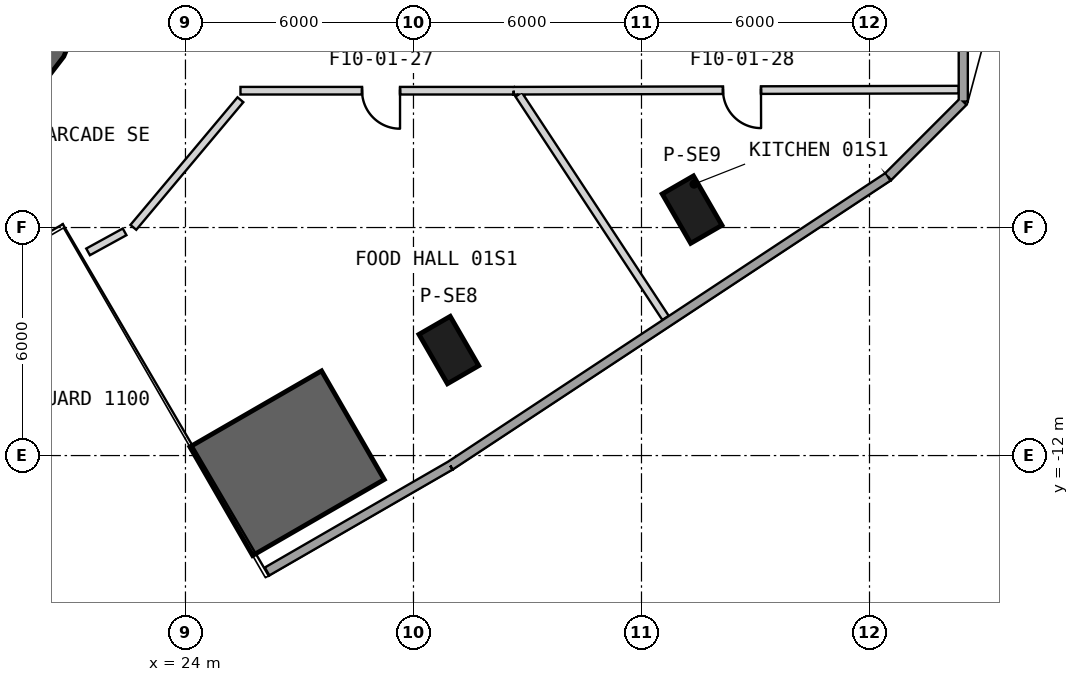
"""IFC4 building model, lengths in metres.
Left out: names, types, materials, properties, quantities, classifications, styles, units other than length and angle.
Written with IfcOpenShell. Run it as: python <this file> out.ifc"""

import sys

from ifc_helpers import new_model, si_unit, direction, frame, frame_2d, origin, origin_2d, place, context, subcontext, project, spatial, polyline, rectangle, outline, extrude, element, fill, save


model = new_model("IFC4")
c1 = context("Model", 3, precision=1e-05, world=origin(), true_north=direction((0.0, 1.0)))
c2 = subcontext(c1, "Body", "Model", "MODEL_VIEW")
j1 = project(units=[si_unit("LENGTHUNIT", "METRE"), si_unit("PLANEANGLEUNIT", "RADIAN")], contexts=[c1])
p1 = place(None, origin())
s1 = spatial("IfcSite", under=j1, at=p1, CompositionType="ELEMENT")
p2 = place(p1, origin())
s2 = spatial("IfcBuilding", under=s1, at=p2, CompositionType="ELEMENT")
p3 = place(p2, frame((0.0, 0.0, 9.0)))
s3 = spatial("IfcBuildingStorey", under=s2, at=p3, CompositionType="ELEMENT", Elevation=9.0)
for number, where, z_axis, x_axis in (
    (1, (30.93, -9.224, 0.0), (0.0, 0.0, 1.0), (0.5, -0.866, 0.0)),
    (2, (37.331, -5.528, 0.0), (0.0, 0.0, 1.0), (0.5, -0.866, 0.0)),
):
    element("IfcColumn", number, at=place(p3, frame(where, z_axis=z_axis, x_axis=x_axis)), inside=s3, PredefinedType="COLUMN", context=c2, shape_type="SweptSolid", body=[
        extrude(rectangle(XDim=1.5, YDim=0.95, at=origin_2d()), origin(), (0.0, 0.0, 1.0), 6.5),
    ])
p4 = place(p3, origin())
e3 = element("IfcWall", 3, at=p4, inside=s3, PredefinedType="SHEAR", context=c2, shape_type="SweptSolid", body=[
    extrude(outline(polyline([(19.7, -2.598), (20.321, -2.121), (20.798, -1.5), (21.098, -0.777), (21.2, 0.0), (21.098, 0.777), (20.798, 1.5), (20.321, 2.121), (19.7, 2.598), (19.25, 1.819), (19.685, 1.485), (20.019, 1.05), (20.229, 0.543), (20.3, 0.0), (20.229, -0.543), (20.019, -1.05), (19.685, -1.485), (19.25, -1.819), (19.7, -2.598)])), origin(), (0.0, 0.0, 1.0), 6.5),
])
p5 = place(p3, origin())
e4 = element("IfcWall", 4, at=p5, inside=s3, PredefinedType="SHEAR", context=c2, shape_type="SweptSolid", body=[
    extrude(outline(polyline([(25.767, -14.63), (29.231, -12.63), (27.581, -9.772), (24.117, -11.772), (25.767, -14.63)])), origin(), (0.0, 0.0, 1.0), 6.5),
])
p6 = place(p3, frame((26.147, -15.05, 0.0), z_axis=(0.0, 0.0, 1.0), x_axis=(0.865999312459, 0.500045188778, 0.0)))
e5 = element("IfcWall", 5, at=p6, inside=s3, PredefinedType="SOLIDWALL", context=c2, shape_type="SweptSolid", body=[
    extrude(rectangle(XDim=5.566, YDim=0.24, at=frame_2d((2.783, 0.0))), origin(), (0.0, 0.0, 1.0), 6.2),
])
p7 = place(p3, frame((30.968, -12.267, 0.0), z_axis=(0.0, 0.0, 1.0), x_axis=(0.834683405501, 0.550730072342, 0.0)))
e6 = element("IfcWall", 6, at=p7, inside=s3, PredefinedType="SOLIDWALL", context=c2, shape_type="SweptSolid", body=[
    extrude(rectangle(XDim=13.801, YDim=0.24, at=frame_2d((6.901, 0.0))), origin(), (0.0, 0.0, 1.0), 6.2),
])
p8 = place(p3, frame((42.487, -4.666, 0.0), z_axis=(0.0, 0.0, 1.0), x_axis=(0.707106781187, 0.707106781187, 0.0)))
e7 = element("IfcWall", 7, at=p8, inside=s3, PredefinedType="SOLIDWALL", context=c2, shape_type="SweptSolid", body=[
    extrude(rectangle(XDim=2.801, YDim=0.24, at=frame_2d((1.4, 0.0))), origin(), (0.0, 0.0, 1.0), 6.2),
])
p9 = place(p3, frame((44.468, -2.686, 0.0), z_axis=(0.0, 0.0, 1.0), x_axis=(0.0, 1.0, 0.0)))
e8 = element("IfcWall", 8, at=p9, inside=s3, PredefinedType="SOLIDWALL", context=c2, shape_type="SweptSolid", body=[
    extrude(rectangle(XDim=5.371, YDim=0.24, at=frame_2d((2.686, 0.0))), origin(), (0.0, 0.0, 1.0), 6.2),
])
p10 = place(p3, frame((32.639, -2.4, 0.0), z_axis=(0.0, 0.0, 1.0), x_axis=(-0.999999999424, -3.3950093e-05, 0.0)))
e9 = element("IfcWall", 9, at=p10, inside=s3, PredefinedType="PARTITIONING", context=c2, shape_type="SweptSolid", body=[
    extrude(rectangle(XDim=7.191, YDim=0.2, at=frame_2d((3.596, 0.0))), origin(), (0.0, 0.0, 1.0), 6.2),
])
p11 = place(p10, frame((2.992, 0.0, 0.0)))
e10 = element("IfcOpeningElement", 10, at=p11, cuts=e9, PredefinedType="OPENING", context=c2, shape_type="SweptSolid", body=[
    extrude(rectangle(XDim=1.0, YDim=2.1, at=frame_2d((0.5, 1.05))), frame((0.0, 0.11, 0.0), z_axis=(0.0, -1.0, 0.0), x_axis=(1.0, 0.0, 0.0)), (0.0, 0.0, 1.0), 0.22),
])
p12 = place(p3, frame((22.629, -5.995, 0.0), z_axis=(0.0, 0.0, 1.0), x_axis=(0.642788383403, 0.766043793893, 0.0)))
e11 = element("IfcWall", 11, at=p12, inside=s3, PredefinedType="PARTITIONING", context=c2, shape_type="SweptSolid", body=[
    extrude(rectangle(XDim=4.384, YDim=0.2, at=frame_2d((2.192, 0.0))), origin(), (0.0, 0.0, 1.0), 5.28),
])
p13 = place(p3, frame((21.438, -6.641, 0.0), z_axis=(0.0, 0.0, 1.0), x_axis=(0.876812408671, 0.480832611207, 0.0)))
e12 = element("IfcWall", 12, at=p13, inside=s3, PredefinedType="PARTITIONING", context=c2, shape_type="SweptSolid", body=[
    extrude(rectangle(XDim=1.096, YDim=0.2, at=frame_2d((0.548, 0.0))), origin(), (0.0, 0.0, 1.0), 5.58),
])
p14 = place(p3, frame((44.347, -2.371, 0.0), z_axis=(0.0, 0.0, 1.0), x_axis=(-0.999996973144, -0.002460427507, 0.0)))
e13 = element("IfcWall", 13, at=p14, inside=s3, PredefinedType="PARTITIONING", context=c2, shape_type="SweptSolid", body=[
    extrude(rectangle(XDim=11.709, YDim=0.2, at=frame_2d((5.854, 0.0))), origin(), (0.0, 0.0, 1.0), 6.2),
])
p15 = place(p14, frame((5.203, 0.0, 0.0)))
e14 = element("IfcOpeningElement", 14, at=p15, cuts=e13, PredefinedType="OPENING", context=c2, shape_type="SweptSolid", body=[
    extrude(rectangle(XDim=1.0, YDim=2.1, at=frame_2d((0.5, 1.05))), frame((0.0, 0.11, 0.0), z_axis=(0.0, -1.0, 0.0), x_axis=(1.0, 0.0, 0.0)), (0.0, 0.0, 1.0), 0.22),
])
p16 = place(p3, frame((36.634, -8.378, 0.0), z_axis=(0.0, 0.0, 1.0), x_axis=(-0.5495005071, 0.835493382796, 0.0)))
e15 = element("IfcWall", 15, at=p16, inside=s3, PredefinedType="PARTITIONING", context=c2, shape_type="SweptSolid", body=[
    extrude(rectangle(XDim=7.036, YDim=0.2, at=frame_2d((3.518, 0.0))), origin(), (0.0, 0.0, 1.0), 5.28),
])
p17 = place(p11, origin())
e16 = element("IfcDoor", 16, at=p17, inside=s3, OperationType="SINGLE_SWING_LEFT", PredefinedType="USERDEFINED", context=c2, shape_type="SweptSolid", body=[
    extrude(rectangle(XDim=1.0, YDim=2.1, at=frame_2d((0.5, 1.05))), frame((0.0, 0.025, 0.0), z_axis=(0.0, -1.0, 0.0), x_axis=(1.0, 0.0, 0.0)), (0.0, 0.0, 1.0), 0.05),
])
fill(e10, e16)
p18 = place(p15, origin())
e17 = element("IfcDoor", 17, at=p18, inside=s3, OperationType="SINGLE_SWING_LEFT", PredefinedType="USERDEFINED", context=c2, shape_type="SweptSolid", body=[
    extrude(rectangle(XDim=1.0, YDim=2.1, at=frame_2d((0.5, 1.05))), frame((0.0, 0.025, 0.0), z_axis=(0.0, -1.0, 0.0), x_axis=(1.0, 0.0, 0.0)), (0.0, 0.0, 1.0), 0.05),
])
fill(e14, e17)
save(model, sys.argv[1])
